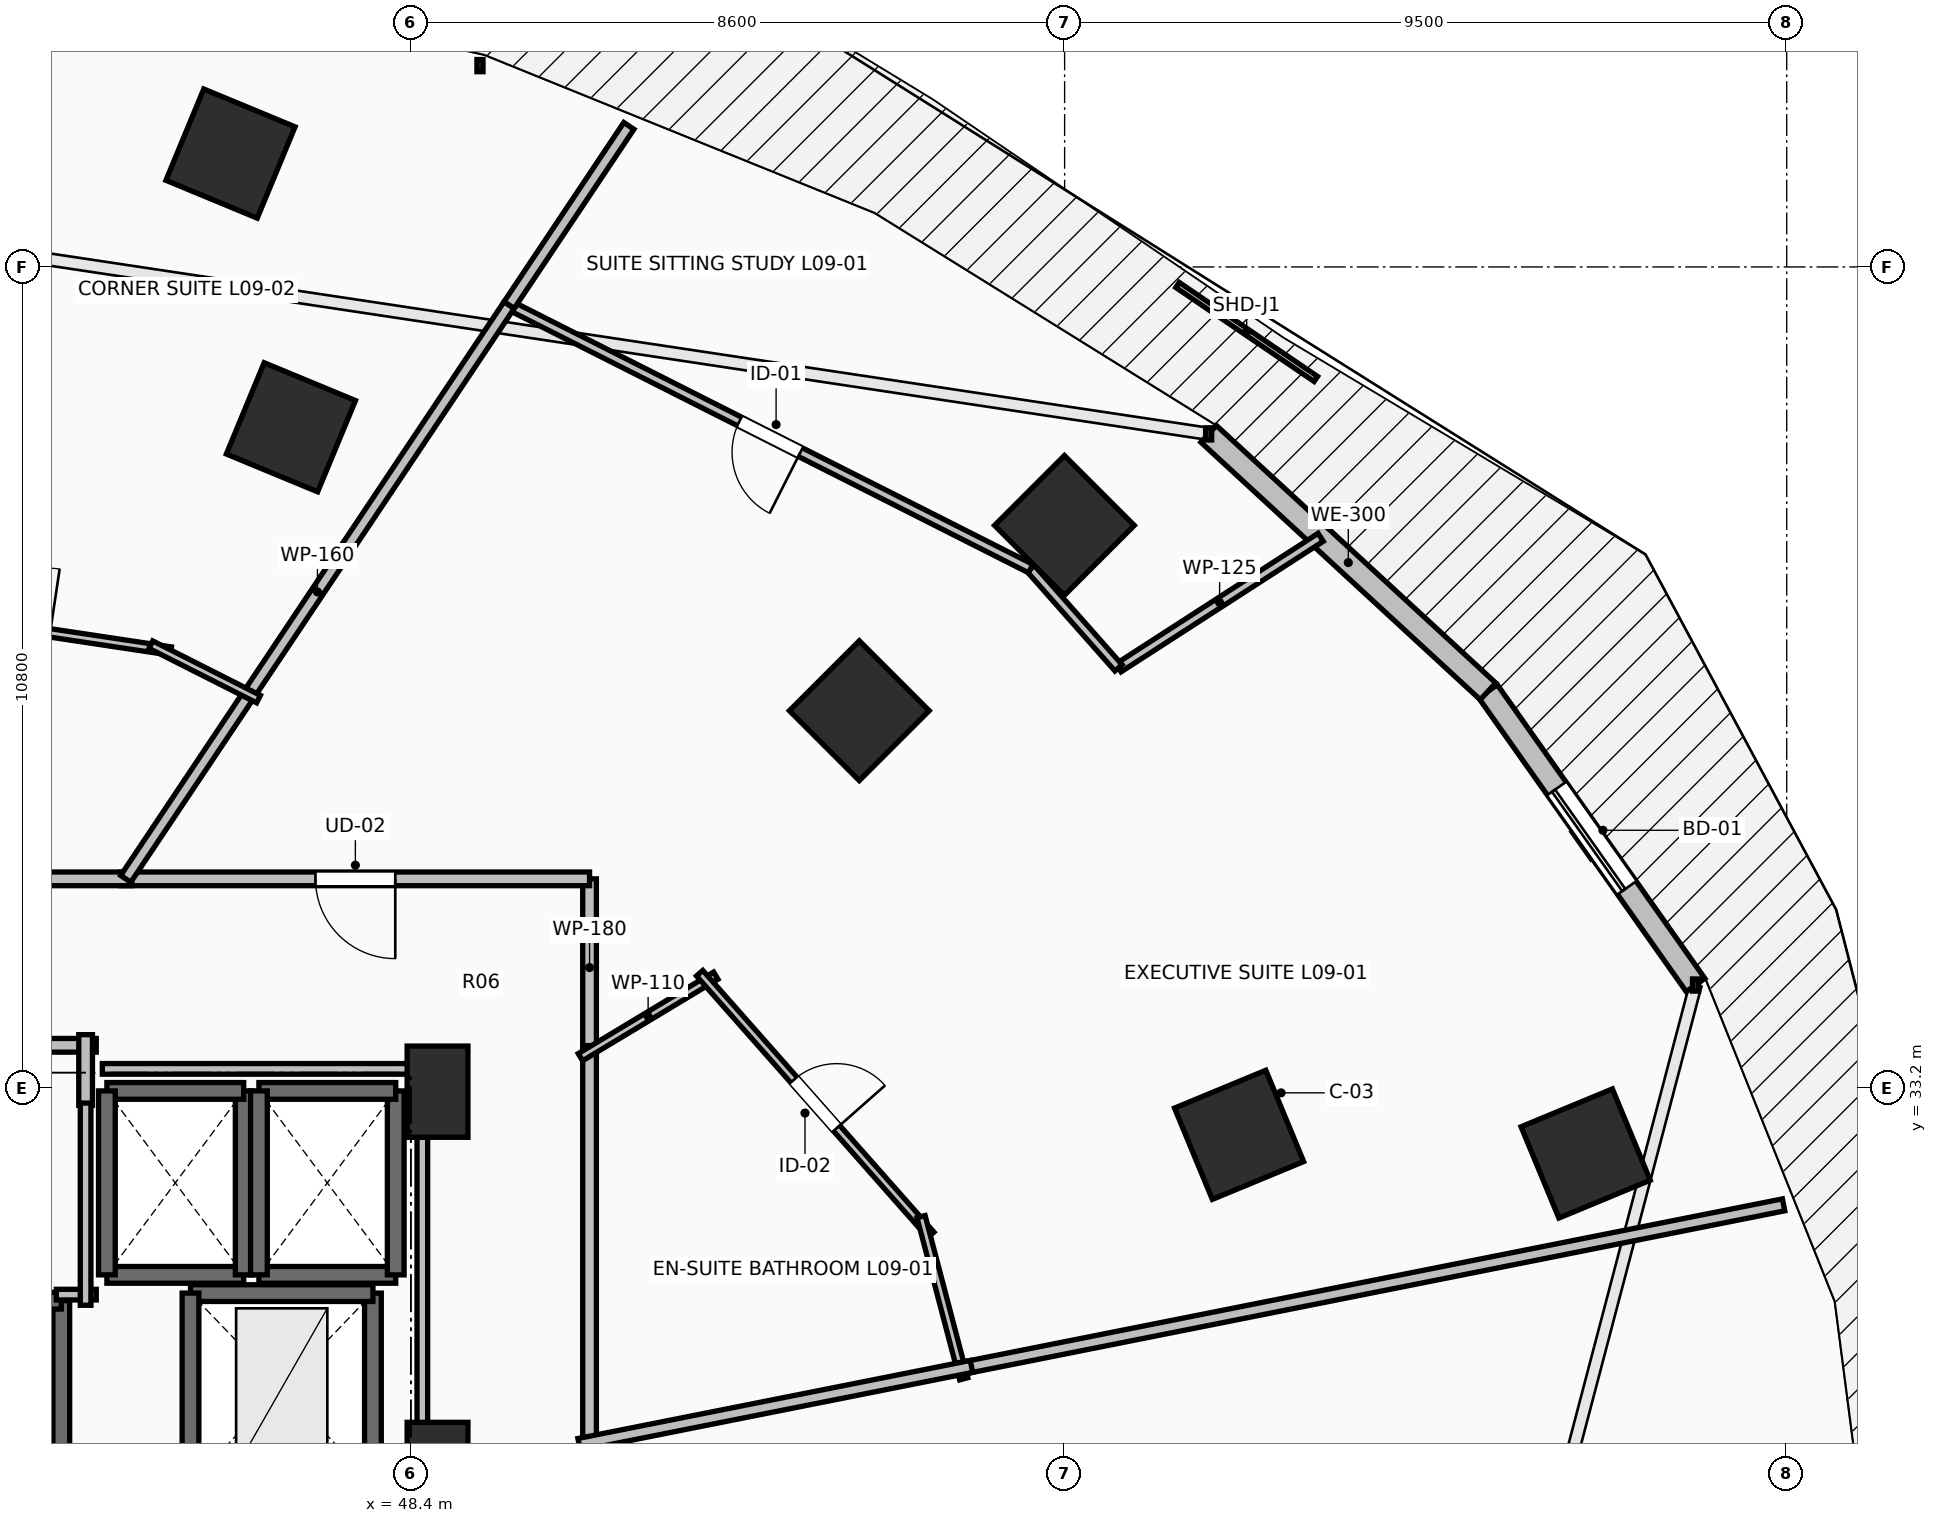
"""IFC4 building model, lengths in metres.
Left out: names, types, materials, properties, quantities, classifications, styles, units other than length and angle.
Written with IfcOpenShell. Run it as: python <this file> out.ifc"""

import sys

from ifc_helpers import new_model, si_unit, direction, frame, frame_2d, origin, origin_2d, place, context, subcontext, project, spatial, rectangle, extrude, element, fill, save


model = new_model("IFC4")
c1 = context("Model", 3, precision=1e-05, world=origin(), true_north=direction((0.0, 1.0)))
c2 = subcontext(c1, "Body", "Model", "MODEL_VIEW")
j1 = project(units=[si_unit("LENGTHUNIT", "METRE"), si_unit("PLANEANGLEUNIT", "RADIAN")], contexts=[c1])
p1 = place(None, origin())
s1 = spatial("IfcSite", under=j1, at=p1, CompositionType="ELEMENT")
p2 = place(p1, origin())
s2 = spatial("IfcBuilding", under=s1, at=p2, CompositionType="ELEMENT")
p3 = place(p2, frame((0.0, 0.0, 38.0)))
s3 = spatial("IfcBuildingStorey", under=s2, at=p3, CompositionType="ELEMENT", Elevation=38.0)
for number, where, z_axis, x_axis in (
    (1, (59.295, 32.582, 0.0), (0.0, 0.0, 1.0), (0.924, 0.383, 0.0)),
    (2, (54.299, 38.162, 0.0), (0.0, 0.0, 1.0), (0.707, 0.707, 0.0)),
    (3, (46.821, 41.891, 0.0), (0.0, 0.0, 1.0), (0.383, 0.924, 0.0)),
    (4, (63.854, 32.337, 0.0), (0.0, 0.0, 1.0), (0.924, 0.383, 0.0)),
    (5, (56.997, 40.6, 0.0), (0.0, 0.0, 1.0), (0.707, 0.707, 0.0)),
    (6, (46.026, 45.492, 0.0), (0.0, 0.0, 1.0), (0.383, 0.924, 0.0)),
):
    element("IfcColumn", number, at=place(p3, frame(where, z_axis=z_axis, x_axis=x_axis)), inside=s3, PredefinedType="COLUMN", context=c2, shape_type="SweptSolid", body=[
        extrude(rectangle(XDim=1.3, YDim=1.3, at=origin_2d()), origin(), (0.0, 0.0, 1.0), 3.5),
    ])
for number, where, z_axis, x_axis in (
    (7, (48.75, 33.15, 0.0), (0.0, 0.0, 1.0), (1.0, 0.0, 0.0)),
    (8, (48.75, 28.2, 0.0), (0.0, 0.0, 1.0), (1.0, 0.0, 0.0)),
):
    element("IfcColumn", number, at=place(p3, frame(where, z_axis=z_axis, x_axis=x_axis)), inside=s3, PredefinedType="PILASTER", context=c2, shape_type="SweptSolid", body=[
        extrude(rectangle(XDim=0.8, YDim=1.2, at=origin_2d()), origin(), (0.0, 0.0, 1.0), 3.5),
    ])
p4 = place(p3, frame((65.301, 34.553, 0.0), z_axis=(0.0, 0.0, 1.0), x_axis=(-0.577130815624, 0.816651713803, 0.0)))
e9 = element("IfcWall", 9, at=p4, inside=s3, PredefinedType="STANDARD", context=c2, shape_type="SweptSolid", body=[
    extrude(rectangle(XDim=4.731, YDim=0.3, at=frame_2d((2.366, 0.0))), origin(), (0.0, 0.0, 1.0), 3.24),
])
p5 = place(p4, frame((1.566, 0.0, 0.0)))
e10 = element("IfcOpeningElement", 10, at=p5, cuts=e9, PredefinedType="OPENING", context=c2, shape_type="SweptSolid", body=[
    extrude(rectangle(XDim=1.6, YDim=2.3, at=frame_2d((0.8, 1.15))), frame((0.0, 0.165, 0.0), z_axis=(0.0, -1.0, 0.0), x_axis=(1.0, 0.0, 0.0)), (0.0, 0.0, 1.0), 0.33),
])
p6 = place(p3, frame((62.57, 38.417, 0.0), z_axis=(0.0, 0.0, 1.0), x_axis=(-0.735342629635, 0.677695519419, 0.0)))
e11 = element("IfcWall", 11, at=p6, inside=s3, PredefinedType="STANDARD", context=c2, shape_type="SweptSolid", body=[
    extrude(rectangle(XDim=4.997, YDim=0.3, at=frame_2d((2.499, 0.0))), origin(), (0.0, 0.0, 1.0), 3.24),
])
p7 = place(p3, frame((43.8, 27.8, 0.0), z_axis=(0.0, 0.0, 1.0), x_axis=(0.0, 1.0, 0.0)))
e12 = element("IfcWall", 12, at=p7, inside=s3, PredefinedType="SOLIDWALL", context=c2, shape_type="SweptSolid", body=[
    extrude(rectangle(XDim=2.6, YDim=0.22, at=frame_2d((1.3, 0.0))), origin(), (0.0, 0.0, 1.0), 3.24),
])
p8 = place(p3, frame((43.8, 30.4, 0.0), z_axis=(0.0, 0.0, 1.0), x_axis=(-1.0, 0.0, 0.0)))
e13 = element("IfcWall", 13, at=p8, inside=s3, PredefinedType="SOLIDWALL", context=c2, shape_type="SweptSolid", body=[
    extrude(rectangle(XDim=2.2, YDim=0.22, at=frame_2d((1.1, 0.0))), origin(), (0.0, 0.0, 1.0), 3.24),
])
p9 = place(p3, frame((44.4, 30.74, 0.0), z_axis=(0.0, 0.0, 1.0), x_axis=(1.0, 0.0, 0.0)))
e14 = element("IfcWall", 14, at=p9, inside=s3, PredefinedType="SOLIDWALL", context=c2, shape_type="SweptSolid", body=[
    extrude(rectangle(XDim=1.8, YDim=0.22, at=frame_2d((0.9, 0.0))), origin(), (0.0, 0.0, 1.0), 3.24),
])
p10 = place(p3, frame((46.2, 30.74, 0.0), z_axis=(0.0, 0.0, 1.0), x_axis=(0.0, 1.0, 0.0)))
e15 = element("IfcWall", 15, at=p10, inside=s3, PredefinedType="SOLIDWALL", context=c2, shape_type="SweptSolid", body=[
    extrude(rectangle(XDim=2.42, YDim=0.22, at=frame_2d((1.21, 0.0))), origin(), (0.0, 0.0, 1.0), 3.24),
])
p11 = place(p3, frame((46.2, 33.16, 0.0), z_axis=(0.0, 0.0, 1.0), x_axis=(-1.0, 0.0, 0.0)))
e16 = element("IfcWall", 16, at=p11, inside=s3, PredefinedType="SOLIDWALL", context=c2, shape_type="SweptSolid", body=[
    extrude(rectangle(XDim=1.8, YDim=0.22, at=frame_2d((0.9, 0.0))), origin(), (0.0, 0.0, 1.0), 3.24),
])
p12 = place(p3, frame((44.4, 33.16, 0.0), z_axis=(0.0, 0.0, 1.0), x_axis=(0.0, -1.0, 0.0)))
e17 = element("IfcWall", 17, at=p12, inside=s3, PredefinedType="SOLIDWALL", context=c2, shape_type="SweptSolid", body=[
    extrude(rectangle(XDim=2.42, YDim=0.22, at=frame_2d((1.21, 0.0))), origin(), (0.0, 0.0, 1.0), 3.24),
])
p13 = place(p3, frame((46.4, 30.74, 0.0), z_axis=(0.0, 0.0, 1.0), x_axis=(1.0, 0.0, 0.0)))
e18 = element("IfcWall", 18, at=p13, inside=s3, PredefinedType="SOLIDWALL", context=c2, shape_type="SweptSolid", body=[
    extrude(rectangle(XDim=1.8, YDim=0.22, at=frame_2d((0.9, 0.0))), origin(), (0.0, 0.0, 1.0), 3.24),
])
p14 = place(p3, frame((48.2, 30.74, 0.0), z_axis=(0.0, 0.0, 1.0), x_axis=(0.0, 1.0, 0.0)))
e19 = element("IfcWall", 19, at=p14, inside=s3, PredefinedType="SOLIDWALL", context=c2, shape_type="SweptSolid", body=[
    extrude(rectangle(XDim=2.42, YDim=0.22, at=frame_2d((1.21, 0.0))), origin(), (0.0, 0.0, 1.0), 3.24),
])
p15 = place(p3, frame((48.2, 33.16, 0.0), z_axis=(0.0, 0.0, 1.0), x_axis=(-1.0, 0.0, 0.0)))
e20 = element("IfcWall", 20, at=p15, inside=s3, PredefinedType="SOLIDWALL", context=c2, shape_type="SweptSolid", body=[
    extrude(rectangle(XDim=1.8, YDim=0.22, at=frame_2d((0.9, 0.0))), origin(), (0.0, 0.0, 1.0), 3.24),
])
p16 = place(p3, frame((46.4, 33.16, 0.0), z_axis=(0.0, 0.0, 1.0), x_axis=(0.0, -1.0, 0.0)))
e21 = element("IfcWall", 21, at=p16, inside=s3, PredefinedType="SOLIDWALL", context=c2, shape_type="SweptSolid", body=[
    extrude(rectangle(XDim=2.42, YDim=0.22, at=frame_2d((1.21, 0.0))), origin(), (0.0, 0.0, 1.0), 3.24),
])
p17 = place(p3, frame((47.9, 28.0, 0.0), z_axis=(0.0, 0.0, 1.0), x_axis=(0.0, 1.0, 0.0)))
e22 = element("IfcWall", 22, at=p17, inside=s3, PredefinedType="SHEAR", context=c2, shape_type="SweptSolid", body=[
    extrude(rectangle(XDim=2.5, YDim=0.22, at=frame_2d((1.25, 0.0))), origin(), (0.0, 0.0, 1.0), 3.24),
])
p18 = place(p3, frame((47.9, 30.5, 0.0), z_axis=(0.0, 0.0, 1.0), x_axis=(-1.0, 0.0, 0.0)))
e23 = element("IfcWall", 23, at=p18, inside=s3, PredefinedType="SHEAR", context=c2, shape_type="SweptSolid", body=[
    extrude(rectangle(XDim=2.4, YDim=0.22, at=frame_2d((1.2, 0.0))), origin(), (0.0, 0.0, 1.0), 3.24),
])
p19 = place(p3, frame((45.5, 30.5, 0.0), z_axis=(0.0, 0.0, 1.0), x_axis=(0.0, -1.0, 0.0)))
e24 = element("IfcWall", 24, at=p19, inside=s3, PredefinedType="SHEAR", context=c2, shape_type="SweptSolid", body=[
    extrude(rectangle(XDim=2.5, YDim=0.22, at=frame_2d((1.25, 0.0))), origin(), (0.0, 0.0, 1.0), 3.24),
])
p20 = place(p3, frame((44.26, 33.76, 0.0), z_axis=(0.0, 0.0, 1.0), x_axis=(-1.0, 0.0, 0.0)))
e25 = element("IfcWall", 25, at=p20, inside=s3, PredefinedType="PARTITIONING", context=c2, shape_type="SweptSolid", body=[
    extrude(rectangle(XDim=6.91, YDim=0.18, at=frame_2d((3.455, 0.0))), origin(), (0.0, 0.0, 1.0), 3.24),
])
p21 = place(p20, frame((3.03, 0.0, 0.0)))
e26 = element("IfcOpeningElement", 26, at=p21, cuts=e25, PredefinedType="OPENING", context=c2, shape_type="SweptSolid", body=[
    extrude(rectangle(XDim=0.85, YDim=2.1, at=frame_2d((0.425, 1.05))), frame((0.0, 0.105, 0.0), z_axis=(0.0, -1.0, 0.0), x_axis=(1.0, 0.0, 0.0)), (0.0, 0.0, 1.0), 0.21),
])
p22 = place(p3, frame((44.12, 32.97, 0.0), z_axis=(0.0, 0.0, 1.0), x_axis=(0.0, 1.0, 0.0)))
e27 = element("IfcWall", 27, at=p22, inside=s3, PredefinedType="PARTITIONING", context=c2, shape_type="SweptSolid", body=[
    extrude(rectangle(XDim=0.93, YDim=0.18, at=frame_2d((0.465, 0.0))), origin(), (0.0, 0.0, 1.0), 3.24),
])
p23 = place(p3, frame((50.75, 33.616, 0.0), z_axis=(0.0, 0.0, 1.0), x_axis=(0.0, 1.0, 0.0)))
e28 = element("IfcWall", 28, at=p23, inside=s3, PredefinedType="PARTITIONING", context=c2, shape_type="SweptSolid", body=[
    extrude(rectangle(XDim=2.334, YDim=0.18, at=frame_2d((1.167, 0.0))), origin(), (0.0, 0.0, 1.0), 2.432),
])
p24 = place(p3, frame((50.75, 35.95, 0.0), z_axis=(0.0, 0.0, 1.0), x_axis=(-1.0, 0.0, 0.0)))
e29 = element("IfcWall", 29, at=p24, inside=s3, PredefinedType="PARTITIONING", context=c2, shape_type="SweptSolid", body=[
    extrude(rectangle(XDim=6.162, YDim=0.18, at=frame_2d((3.081, 0.0))), origin(), (0.0, 0.0, 1.0), 2.432),
])
p25 = place(p24, frame((2.556, 0.0, 0.0)))
e30 = element("IfcOpeningElement", 30, at=p25, cuts=e29, PredefinedType="OPENING", context=c2, shape_type="SweptSolid", body=[
    extrude(rectangle(XDim=1.05, YDim=2.2, at=frame_2d((0.525, 1.1))), frame((0.0, 0.105, 0.0), z_axis=(0.0, -1.0, 0.0), x_axis=(1.0, 0.0, 0.0)), (0.0, 0.0, 1.0), 0.21),
])
p26 = place(p3, frame((50.75, 28.336, 0.0), z_axis=(0.0, 0.0, 1.0), x_axis=(0.0, 1.0, 0.0)))
e31 = element("IfcWall", 31, at=p26, inside=s3, PredefinedType="PARTITIONING", context=c2, shape_type="SweptSolid", body=[
    extrude(rectangle(XDim=5.42, YDim=0.18, at=frame_2d((2.71, 0.0))), origin(), (0.0, 0.0, 1.0), 2.432),
])
p27 = place(p3, frame((44.728, 35.95, 0.0), z_axis=(0.0, 0.0, 1.0), x_axis=(-1.0, 0.0, 0.0)))
e32 = element("IfcWall", 32, at=p27, inside=s3, PredefinedType="PARTITIONING", context=c2, shape_type="SweptSolid", body=[
    extrude(rectangle(XDim=4.334, YDim=0.18, at=frame_2d((2.167, 0.0))), origin(), (0.0, 0.0, 1.0), 3.24),
])
p28 = place(p3, frame((50.63, 33.604, 0.0), z_axis=(0.0, 0.0, 1.0), x_axis=(0.856631627837, 0.515928535932, 0.0)))
e33 = element("IfcWall", 33, at=p28, inside=s3, PredefinedType="PARTITIONING", context=c2, shape_type="SweptSolid", body=[
    extrude(rectangle(XDim=2.079, YDim=0.11, at=frame_2d((1.04, 0.0))), origin(), (0.0, 0.0, 1.0), 3.24),
])
p29 = place(p3, frame((52.198, 34.709, 0.0), z_axis=(0.0, 0.0, 1.0), x_axis=(0.662071486681, -0.74944068913, 0.0)))
e34 = element("IfcWall", 34, at=p29, inside=s3, PredefinedType="PARTITIONING", context=c2, shape_type="SweptSolid", body=[
    extrude(rectangle(XDim=4.594, YDim=0.11, at=frame_2d((2.297, 0.0))), origin(), (0.0, 0.0, 1.0), 2.432),
])
p30 = place(p29, frame((1.872, 0.0, 0.0)))
e35 = element("IfcOpeningElement", 35, at=p30, cuts=e34, PredefinedType="OPENING", context=c2, shape_type="SweptSolid", body=[
    extrude(rectangle(XDim=0.85, YDim=2.1, at=frame_2d((0.425, 1.05))), frame((0.0, 0.07, 0.0), z_axis=(0.0, -1.0, 0.0), x_axis=(1.0, 0.0, 0.0)), (0.0, 0.0, 1.0), 0.14),
])
p31 = place(p3, frame((55.111, 31.506, 0.0), z_axis=(0.0, 0.0, 1.0), x_axis=(0.254389812051, -0.967101764823, 0.0)))
e36 = element("IfcWall", 36, at=p31, inside=s3, PredefinedType="PARTITIONING", context=c2, shape_type="SweptSolid", body=[
    extrude(rectangle(XDim=2.206, YDim=0.11, at=frame_2d((1.103, 0.0))), origin(), (0.0, 0.0, 1.0), 3.24),
])
p32 = place(p3, frame((60.369, 40.443, 0.0), z_axis=(0.0, 0.0, 1.0), x_axis=(-0.840157237287, -0.542342895809, 0.0)))
e37 = element("IfcWall", 37, at=p32, inside=s3, PredefinedType="PARTITIONING", context=c2, shape_type="SweptSolid", body=[
    extrude(rectangle(XDim=3.166, YDim=0.125, at=frame_2d((1.583, 0.0))), origin(), (0.0, 0.0, 1.0), 2.624),
])
p33 = place(p3, frame((57.709, 38.726, 0.0), z_axis=(0.0, 0.0, 1.0), x_axis=(-0.662510427818, 0.749052690425, 0.0)))
e38 = element("IfcWall", 38, at=p33, inside=s3, PredefinedType="PARTITIONING", context=c2, shape_type="SweptSolid", body=[
    extrude(rectangle(XDim=1.743, YDim=0.125, at=frame_2d((0.872, 0.0))), origin(), (0.0, 0.0, 1.0), 2.432),
])
p34 = place(p3, frame((56.554, 40.032, 0.0), z_axis=(0.0, 0.0, 1.0), x_axis=(-0.892545780062, 0.450956794487, 0.0)))
e39 = element("IfcWall", 39, at=p34, inside=s3, PredefinedType="PARTITIONING", context=c2, shape_type="SweptSolid", body=[
    extrude(rectangle(XDim=7.688, YDim=0.125, at=frame_2d((3.844, 0.0))), origin(), (0.0, 0.0, 1.0), 2.432),
])
p35 = place(p34, frame((3.394, 0.0, 0.0)))
e40 = element("IfcOpeningElement", 40, at=p35, cuts=e39, PredefinedType="OPENING", context=c2, shape_type="SweptSolid", body=[
    extrude(rectangle(XDim=0.9, YDim=2.1, at=frame_2d((0.45, 1.05))), frame((0.0, 0.077, 0.0), z_axis=(0.0, -1.0, 0.0), x_axis=(1.0, 0.0, 0.0)), (0.0, 0.0, 1.0), 0.155),
])
p36 = place(p3, frame((49.692, 43.499, 0.0), z_axis=(0.0, 0.0, 1.0), x_axis=(-0.555556259167, -0.831478949163, 0.0)))
e41 = element("IfcWall", 41, at=p36, inside=s3, PredefinedType="PARTITIONING", context=c2, shape_type="SweptSolid", body=[
    extrude(rectangle(XDim=9.079, YDim=0.16, at=frame_2d((4.54, 0.0))), origin(), (0.0, 0.0, 1.0), 2.432),
])
p37 = place(p3, frame((55.637, 29.508, 0.0), z_axis=(0.0, 0.0, 1.0), x_axis=(0.980781844691, 0.195107593712, 0.0)))
e42 = element("IfcWall", 42, at=p37, inside=s3, PredefinedType="PARTITIONING", context=c2, shape_type="SweptSolid", body=[
    extrude(rectangle(XDim=11.034, YDim=0.16, at=frame_2d((5.517, 0.0))), origin(), (0.0, 0.0, 1.0), 2.624),
])
p38 = place(p3, frame((50.613, 28.509, 0.0), z_axis=(0.0, 0.0, 1.0), x_axis=(0.980788877604, 0.195072236795, 0.0)))
e43 = element("IfcWall", 43, at=p38, inside=s3, PredefinedType="PARTITIONING", context=c2, shape_type="SweptSolid", body=[
    extrude(rectangle(XDim=5.263, YDim=0.16, at=frame_2d((2.631, 0.0))), origin(), (0.0, 0.0, 1.0), 2.972),
])
p39 = place(p3, frame((51.267, 45.856, 0.0), z_axis=(0.0, 0.0, 1.0), x_axis=(-0.555653789226, -0.831413775757, 0.0)))
e44 = element("IfcWall", 44, at=p39, inside=s3, PredefinedType="PARTITIONING", context=c2, shape_type="SweptSolid", body=[
    extrude(rectangle(XDim=2.835, YDim=0.16, at=frame_2d((1.417, 0.0))), origin(), (0.0, 0.0, 1.0), 2.624),
])
p40 = place(p3, frame((41.223, 39.551, 0.0), z_axis=(0.0, 0.0, 1.0), x_axis=(0.988911221338, -0.148507899833, 0.0)))
e45 = element("IfcWall", 45, at=p40, inside=s3, PredefinedType="PARTITIONING", context=c2, shape_type="SweptSolid", body=[
    extrude(rectangle(XDim=4.064, YDim=0.11, at=frame_2d((2.032, 0.0))), origin(), (0.0, 0.0, 1.0), 3.24),
])
p41 = place(p40, frame((1.607, 0.0, 0.0)))
e46 = element("IfcOpeningElement", 46, at=p41, cuts=e45, PredefinedType="OPENING", context=c2, shape_type="SweptSolid", body=[
    extrude(rectangle(XDim=0.85, YDim=2.1, at=frame_2d((0.425, 1.05))), frame((0.0, 0.07, 0.0), z_axis=(0.0, -1.0, 0.0), x_axis=(1.0, 0.0, 0.0)), (0.0, 0.0, 1.0), 0.14),
])
p42 = place(p3, frame((44.978, 39.031, 0.0), z_axis=(0.0, 0.0, 1.0), x_axis=(0.892388427115, -0.451268096758, 0.0)))
e47 = element("IfcWall", 47, at=p42, inside=s3, PredefinedType="PARTITIONING", context=c2, shape_type="SweptSolid", body=[
    extrude(rectangle(XDim=1.588, YDim=0.11, at=frame_2d((0.794, 0.0))), origin(), (0.0, 0.0, 1.0), 3.24),
])
p43 = place(p3, frame((43.735, 30.48, 0.0), z_axis=(0.0, 0.0, 1.0), x_axis=(1.0, 0.0, 0.0)))
e48 = element("IfcWall", 48, at=p43, inside=s3, PredefinedType="PARTITIONING", context=c2, shape_type="SweptSolid", body=[
    extrude(rectangle(XDim=0.525, YDim=0.14, at=frame_2d((0.262, 0.0))), origin(), (0.0, 0.0, 1.0), 3.24),
])
p44 = place(p3, frame((44.12, 30.34, 0.0), z_axis=(0.0, 0.0, 1.0), x_axis=(0.0, 1.0, 0.0)))
e49 = element("IfcWall", 49, at=p44, inside=s3, PredefinedType="PARTITIONING", context=c2, shape_type="SweptSolid", body=[
    extrude(rectangle(XDim=2.66, YDim=0.14, at=frame_2d((1.33, 0.0))), origin(), (0.0, 0.0, 1.0), 3.24),
])
p45 = place(p3, frame((44.34, 33.45, 0.0), z_axis=(0.0, 0.0, 1.0), x_axis=(1.0, 0.0, 0.0)))
e50 = element("IfcWall", 50, at=p45, inside=s3, PredefinedType="PARTITIONING", context=c2, shape_type="SweptSolid", body=[
    extrude(rectangle(XDim=4.21, YDim=0.14, at=frame_2d((2.105, 0.0))), origin(), (0.0, 0.0, 1.0), 2.432),
])
p46 = place(p3, frame((48.55, 33.45, 0.0), z_axis=(0.0, 0.0, 1.0), x_axis=(0.0, -1.0, 0.0)))
e51 = element("IfcWall", 51, at=p46, inside=s3, PredefinedType="PARTITIONING", context=c2, shape_type="SweptSolid", body=[
    extrude(rectangle(XDim=5.254, YDim=0.14, at=frame_2d((2.627, 0.0))), origin(), (0.0, 0.0, 1.0), 2.432),
])
p47 = place(p5, origin())
e52 = element("IfcDoor", 52, at=p47, inside=s3, OperationType="SLIDING_TO_LEFT", PredefinedType="DOOR", context=c2, shape_type="SweptSolid", body=[
    extrude(rectangle(XDim=1.6, YDim=2.3, at=frame_2d((0.8, 1.15))), frame((0.0, 0.025, 0.0), z_axis=(0.0, -1.0, 0.0), x_axis=(1.0, 0.0, 0.0)), (0.0, 0.0, 1.0), 0.05),
])
fill(e10, e52)
p48 = place(p25, origin())
e53 = element("IfcDoor", 53, at=p48, inside=s3, OperationType="SINGLE_SWING_LEFT", PredefinedType="DOOR", context=c2, shape_type="SweptSolid", body=[
    extrude(rectangle(XDim=1.05, YDim=2.2, at=frame_2d((0.525, 1.1))), frame((0.0, 0.025, 0.0), z_axis=(0.0, -1.0, 0.0), x_axis=(1.0, 0.0, 0.0)), (0.0, 0.0, 1.0), 0.05),
])
fill(e30, e53)
p49 = place(p30, origin())
e54 = element("IfcDoor", 54, at=p49, inside=s3, OperationType="SINGLE_SWING_RIGHT", PredefinedType="DOOR", context=c2, shape_type="SweptSolid", body=[
    extrude(rectangle(XDim=0.85, YDim=2.1, at=frame_2d((0.425, 1.05))), frame((0.0, 0.025, 0.0), z_axis=(0.0, -1.0, 0.0), x_axis=(1.0, 0.0, 0.0)), (0.0, 0.0, 1.0), 0.05),
])
fill(e35, e54)
p50 = place(p35, origin())
e55 = element("IfcDoor", 55, at=p50, inside=s3, OperationType="SINGLE_SWING_LEFT", PredefinedType="DOOR", context=c2, shape_type="SweptSolid", body=[
    extrude(rectangle(XDim=0.9, YDim=2.1, at=frame_2d((0.45, 1.05))), frame((0.0, 0.025, 0.0), z_axis=(0.0, -1.0, 0.0), x_axis=(1.0, 0.0, 0.0)), (0.0, 0.0, 1.0), 0.05),
])
fill(e40, e55)
save(model, sys.argv[1])
